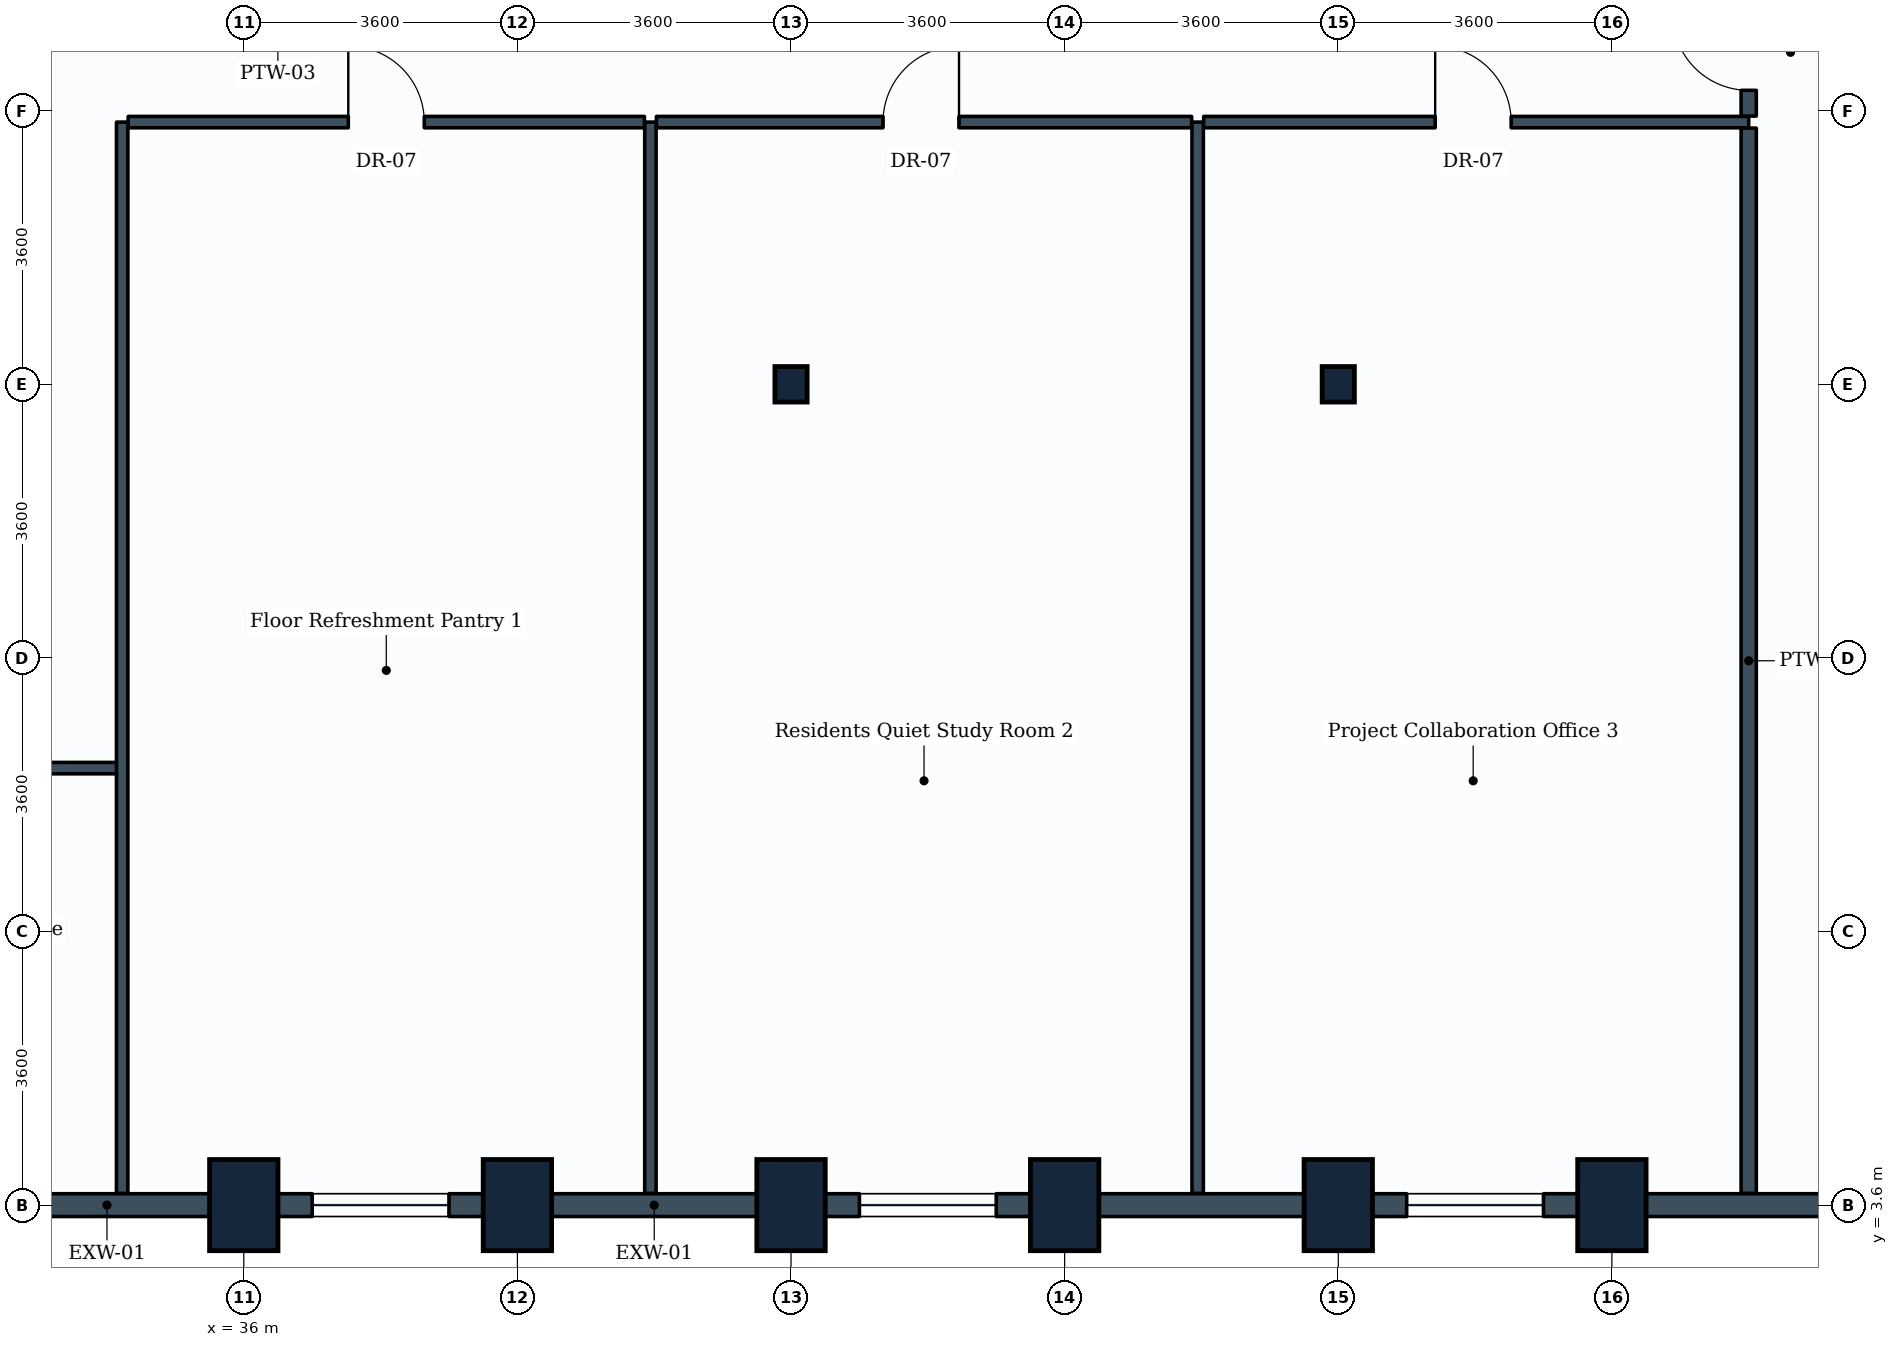
"""IFC4 building model, lengths in metres.
Left out: names, types, materials, properties, quantities, classifications, styles, units other than length and angle.
Written with IfcOpenShell. Run it as: python <this file> out.ifc"""

import sys

from ifc_helpers import new_model, si_unit, direction, frame, frame_2d, origin, origin_2d, place, context, subcontext, project, spatial, rectangle, i_section, extrude, element, fill, save


model = new_model("IFC4")
c1 = context("Model", 3, precision=1e-05, world=origin(), true_north=direction((0.0, 1.0)))
c2 = subcontext(c1, "Body", "Model", "MODEL_VIEW")
j1 = project(units=[si_unit("LENGTHUNIT", "METRE"), si_unit("PLANEANGLEUNIT", "RADIAN")], contexts=[c1])
p1 = place(None, origin())
s1 = spatial("IfcSite", under=j1, at=p1, CompositionType="ELEMENT")
p2 = place(p1, origin())
s2 = spatial("IfcBuilding", under=s1, at=p2, CompositionType="ELEMENT")
p3 = place(p2, frame((0.0, 0.0, 47.4)))
s3 = spatial("IfcBuildingStorey", under=s2, at=p3, CompositionType="ELEMENT", Elevation=47.4)
for number, where, z_axis, x_axis in (
    (1, (36.0, 3.6, 0.0), (0.0, 0.0, 1.0), (1.0, 0.0, 0.0)),
    (2, (39.6, 3.6, 0.0), (0.0, 0.0, 1.0), (1.0, 0.0, 0.0)),
    (3, (43.2, 3.6, 0.0), (0.0, 0.0, 1.0), (1.0, 0.0, 0.0)),
):
    element("IfcColumn", number, at=place(p3, frame(where, z_axis=z_axis, x_axis=x_axis)), inside=s3, PredefinedType="COLUMN", context=c2, shape_type="SweptSolid", body=[
        extrude(rectangle(XDim=0.9, YDim=1.2, at=origin_2d()), origin(), (0.0, 0.0, 1.0), 3.9),
    ])
p4 = place(p3, frame((43.2, 14.4, 0.0), z_axis=(0.0, 0.0, 1.0), x_axis=(1.0, 0.0, 0.0)))
e4 = element("IfcColumn", 4, at=p4, inside=s3, PredefinedType="COLUMN", context=c2, shape_type="SweptSolid", body=[
    extrude(i_section(OverallWidth=0.424, OverallDepth=0.467, WebThickness=0.033, FlangeThickness=0.053, FilletRadius=0.015, at=origin_2d()), origin(), (0.0, 0.0, 1.0), 3.9),
])
for number, where, z_axis, x_axis in (
    (5, (46.8, 3.6, 0.0), (0.0, 0.0, 1.0), (1.0, 0.0, 0.0)),
    (6, (50.4, 3.6, 0.0), (0.0, 0.0, 1.0), (1.0, 0.0, 0.0)),
):
    element("IfcColumn", number, at=place(p3, frame(where, z_axis=z_axis, x_axis=x_axis)), inside=s3, PredefinedType="COLUMN", context=c2, shape_type="SweptSolid", body=[
        extrude(rectangle(XDim=0.9, YDim=1.2, at=origin_2d()), origin(), (0.0, 0.0, 1.0), 3.9),
    ])
p5 = place(p3, frame((50.4, 14.4, 0.0), z_axis=(0.0, 0.0, 1.0), x_axis=(1.0, 0.0, 0.0)))
e7 = element("IfcColumn", 7, at=p5, inside=s3, PredefinedType="COLUMN", context=c2, shape_type="SweptSolid", body=[
    extrude(i_section(OverallWidth=0.424, OverallDepth=0.467, WebThickness=0.033, FlangeThickness=0.053, FilletRadius=0.015, at=origin_2d()), origin(), (0.0, 0.0, 1.0), 3.9),
])
p6 = place(p3, frame((54.0, 3.6, 0.0), z_axis=(0.0, 0.0, 1.0), x_axis=(1.0, 0.0, 0.0)))
e8 = element("IfcColumn", 8, at=p6, inside=s3, PredefinedType="COLUMN", context=c2, shape_type="SweptSolid", body=[
    extrude(rectangle(XDim=0.9, YDim=1.2, at=origin_2d()), origin(), (0.0, 0.0, 1.0), 3.9),
])
p7 = place(p3, frame((36.0, 3.6, 0.0), z_axis=(0.0, 0.0, 1.0), x_axis=(-1.0, 0.0, 0.0)))
e9 = element("IfcWall", 9, at=p7, inside=s3, PredefinedType="STANDARD", context=c2, shape_type="SweptSolid", body=[
    extrude(rectangle(XDim=3.6, YDim=0.3, at=frame_2d((1.8, 0.0))), origin(), (0.0, 0.0, 1.0), 2.93),
])
p8 = place(p3, frame((39.6, 3.6, 0.0), z_axis=(0.0, 0.0, 1.0), x_axis=(-1.0, 0.0, 0.0)))
e10 = element("IfcWall", 10, at=p8, inside=s3, PredefinedType="STANDARD", context=c2, shape_type="SweptSolid", body=[
    extrude(rectangle(XDim=3.6, YDim=0.3, at=frame_2d((1.8, 0.0))), origin(), (0.0, 0.0, 1.0), 2.93),
])
p9 = place(p8, frame((0.9, 0.0, 0.85)))
e11 = element("IfcOpeningElement", 11, at=p9, cuts=e10, PredefinedType="OPENING", context=c2, shape_type="SweptSolid", body=[
    extrude(rectangle(XDim=1.8, YDim=1.35, at=frame_2d((0.9, 0.675))), frame((0.0, 0.16, 0.0), z_axis=(0.0, -1.0, 0.0), x_axis=(1.0, 0.0, 0.0)), (0.0, 0.0, 1.0), 0.32),
])
p10 = place(p3, frame((43.2, 3.6, 0.0), z_axis=(0.0, 0.0, 1.0), x_axis=(-1.0, 0.0, 0.0)))
e12 = element("IfcWall", 12, at=p10, inside=s3, PredefinedType="STANDARD", context=c2, shape_type="SweptSolid", body=[
    extrude(rectangle(XDim=3.6, YDim=0.3, at=frame_2d((1.8, 0.0))), origin(), (0.0, 0.0, 1.0), 2.93),
])
p11 = place(p3, frame((46.8, 3.6, 0.0), z_axis=(0.0, 0.0, 1.0), x_axis=(-1.0, 0.0, 0.0)))
e13 = element("IfcWall", 13, at=p11, inside=s3, PredefinedType="STANDARD", context=c2, shape_type="SweptSolid", body=[
    extrude(rectangle(XDim=3.6, YDim=0.3, at=frame_2d((1.8, 0.0))), origin(), (0.0, 0.0, 1.0), 2.93),
])
p12 = place(p11, frame((0.9, 0.0, 0.85)))
e14 = element("IfcOpeningElement", 14, at=p12, cuts=e13, PredefinedType="OPENING", context=c2, shape_type="SweptSolid", body=[
    extrude(rectangle(XDim=1.8, YDim=1.35, at=frame_2d((0.9, 0.675))), frame((0.0, 0.16, 0.0), z_axis=(0.0, -1.0, 0.0), x_axis=(1.0, 0.0, 0.0)), (0.0, 0.0, 1.0), 0.32),
])
p13 = place(p3, frame((50.4, 3.6, 0.0), z_axis=(0.0, 0.0, 1.0), x_axis=(-1.0, 0.0, 0.0)))
e15 = element("IfcWall", 15, at=p13, inside=s3, PredefinedType="STANDARD", context=c2, shape_type="SweptSolid", body=[
    extrude(rectangle(XDim=3.6, YDim=0.3, at=frame_2d((1.8, 0.0))), origin(), (0.0, 0.0, 1.0), 2.93),
])
p14 = place(p3, frame((54.0, 3.6, 0.0), z_axis=(0.0, 0.0, 1.0), x_axis=(-1.0, 0.0, 0.0)))
e16 = element("IfcWall", 16, at=p14, inside=s3, PredefinedType="STANDARD", context=c2, shape_type="SweptSolid", body=[
    extrude(rectangle(XDim=3.6, YDim=0.3, at=frame_2d((1.8, 0.0))), origin(), (0.0, 0.0, 1.0), 2.93),
])
p15 = place(p14, frame((0.9, 0.0, 0.85)))
e17 = element("IfcOpeningElement", 17, at=p15, cuts=e16, PredefinedType="OPENING", context=c2, shape_type="SweptSolid", body=[
    extrude(rectangle(XDim=1.8, YDim=1.35, at=frame_2d((0.9, 0.675))), frame((0.0, 0.16, 0.0), z_axis=(0.0, -1.0, 0.0), x_axis=(1.0, 0.0, 0.0)), (0.0, 0.0, 1.0), 0.32),
])
p16 = place(p3, frame((57.6, 3.6, 0.0), z_axis=(0.0, 0.0, 1.0), x_axis=(-1.0, 0.0, 0.0)))
e18 = element("IfcWall", 18, at=p16, inside=s3, PredefinedType="STANDARD", context=c2, shape_type="SweptSolid", body=[
    extrude(rectangle(XDim=3.6, YDim=0.3, at=frame_2d((1.8, 0.0))), origin(), (0.0, 0.0, 1.0), 2.93),
])
p17 = place(p3, frame((28.879, 9.35, 0.0), z_axis=(0.0, 0.0, 1.0), x_axis=(1.0, 0.0, 0.0)))
e19 = element("IfcWall", 19, at=p17, inside=s3, PredefinedType="PARTITIONING", context=c2, shape_type="SweptSolid", body=[
    extrude(rectangle(XDim=5.521, YDim=0.15, at=frame_2d((2.76, 0.0))), origin(), (0.0, 0.0, 1.0), 3.635),
])
p18 = place(p17, frame((0.36, 0.0, 0.0)))
e20 = element("IfcOpeningElement", 20, at=p18, cuts=e19, PredefinedType="OPENING", context=c2, shape_type="SweptSolid", body=[
    extrude(rectangle(XDim=1.0, YDim=2.1, at=frame_2d((0.5, 1.05))), frame((0.0, 0.085, 0.0), z_axis=(0.0, -1.0, 0.0), x_axis=(1.0, 0.0, 0.0)), (0.0, 0.0, 1.0), 0.17),
])
for number, where, z_axis, x_axis in (
    (21, (34.4, 3.754, 0.0), (0.0, 0.0, 1.0), (0.0, 1.0, 0.0)),
    (22, (41.35, 3.754, 0.0), (0.0, 0.0, 1.0), (0.0, 1.0, 0.0)),
):
    element("IfcWall", number, at=place(p3, frame(where, z_axis=z_axis, x_axis=x_axis)), inside=s3, PredefinedType="PARTITIONING", context=c2, shape_type="SweptSolid", body=[
        extrude(rectangle(XDim=14.096, YDim=0.15, at=frame_2d((7.048, 0.0))), origin(), (0.0, 0.0, 1.0), 2.93),
    ])
p19 = place(p3, frame((34.479, 17.85, 0.0), z_axis=(0.0, 0.0, 1.0), x_axis=(1.0, 0.0, 0.0)))
e23 = element("IfcWall", 23, at=p19, inside=s3, PredefinedType="PARTITIONING", context=c2, shape_type="SweptSolid", body=[
    extrude(rectangle(XDim=6.792, YDim=0.15, at=frame_2d((3.396, 0.0))), origin(), (0.0, 0.0, 1.0), 3.04),
])
p20 = place(p19, frame((2.896, 0.0, 0.0)))
e24 = element("IfcOpeningElement", 24, at=p20, cuts=e23, PredefinedType="OPENING", context=c2, shape_type="SweptSolid", body=[
    extrude(rectangle(XDim=1.0, YDim=2.1, at=frame_2d((0.5, 1.05))), frame((0.0, 0.085, 0.0), z_axis=(0.0, -1.0, 0.0), x_axis=(1.0, 0.0, 0.0)), (0.0, 0.0, 1.0), 0.17),
])
p21 = place(p3, frame((48.55, 3.754, 0.0), z_axis=(0.0, 0.0, 1.0), x_axis=(0.0, 1.0, 0.0)))
e25 = element("IfcWall", 25, at=p21, inside=s3, PredefinedType="PARTITIONING", context=c2, shape_type="SweptSolid", body=[
    extrude(rectangle(XDim=14.096, YDim=0.15, at=frame_2d((7.048, 0.0))), origin(), (0.0, 0.0, 1.0), 2.93),
])
p22 = place(p3, frame((41.429, 17.85, 0.0), z_axis=(0.0, 0.0, 1.0), x_axis=(1.0, 0.0, 0.0)))
e26 = element("IfcWall", 26, at=p22, inside=s3, PredefinedType="PARTITIONING", context=c2, shape_type="SweptSolid", body=[
    extrude(rectangle(XDim=7.042, YDim=0.15, at=frame_2d((3.521, 0.0))), origin(), (0.0, 0.0, 1.0), 3.03),
])
p23 = place(p22, frame((2.981, 0.0, 0.0)))
e27 = element("IfcOpeningElement", 27, at=p23, cuts=e26, PredefinedType="OPENING", context=c2, shape_type="SweptSolid", body=[
    extrude(rectangle(XDim=1.0, YDim=2.1, at=frame_2d((0.5, 1.05))), frame((0.0, 0.085, 0.0), z_axis=(0.0, -1.0, 0.0), x_axis=(1.0, 0.0, 0.0)), (0.0, 0.0, 1.0), 0.17),
])
p24 = place(p3, frame((48.629, 17.85, 0.0), z_axis=(0.0, 0.0, 1.0), x_axis=(1.0, 0.0, 0.0)))
e28 = element("IfcWall", 28, at=p24, inside=s3, PredefinedType="PARTITIONING", context=c2, shape_type="SweptSolid", body=[
    extrude(rectangle(XDim=7.171, YDim=0.15, at=frame_2d((3.585, 0.0))), origin(), (0.0, 0.0, 1.0), 3.04),
])
p25 = place(p24, frame((3.046, 0.0, 0.0)))
e29 = element("IfcOpeningElement", 29, at=p25, cuts=e28, PredefinedType="OPENING", context=c2, shape_type="SweptSolid", body=[
    extrude(rectangle(XDim=1.0, YDim=2.1, at=frame_2d((0.5, 1.05))), frame((0.0, 0.085, 0.0), z_axis=(0.0, -1.0, 0.0), x_axis=(1.0, 0.0, 0.0)), (0.0, 0.0, 1.0), 0.17),
])
p26 = place(p3, frame((55.8, 3.754, 0.0), z_axis=(0.0, 0.0, 1.0), x_axis=(0.0, 1.0, 0.0)))
e30 = element("IfcWall", 30, at=p26, inside=s3, PredefinedType="PARTITIONING", context=c2, shape_type="SweptSolid", body=[
    extrude(rectangle(XDim=14.017, YDim=0.2, at=frame_2d((7.009, 0.0))), origin(), (0.0, 0.0, 1.0), 2.93),
])
p27 = place(p3, frame((55.8, 17.929, 0.0), z_axis=(0.0, 0.0, 1.0), x_axis=(0.0, 1.0, 0.0)))
e31 = element("IfcWall", 31, at=p27, inside=s3, PredefinedType="PARTITIONING", context=c2, shape_type="SweptSolid", body=[
    extrude(rectangle(XDim=1.692, YDim=0.2, at=frame_2d((0.846, 0.0))), origin(), (0.0, 0.0, 1.0), 3.635),
])
p28 = place(p27, frame((0.339, 0.0, 0.0)))
e32 = element("IfcOpeningElement", 32, at=p28, cuts=e31, PredefinedType="OPENING", context=c2, shape_type="SweptSolid", body=[
    extrude(rectangle(XDim=1.0, YDim=2.1, at=frame_2d((0.5, 1.05))), frame((0.0, 0.11, 0.0), z_axis=(0.0, -1.0, 0.0), x_axis=(1.0, 0.0, 0.0)), (0.0, 0.0, 1.0), 0.22),
])
p29 = place(p9, origin())
e33 = element("IfcWindow", 33, at=p29, inside=s3, PartitioningType="SINGLE_PANEL", PredefinedType="WINDOW", context=c2, shape_type="SweptSolid", body=[
    extrude(rectangle(XDim=1.8, YDim=1.35, at=frame_2d((0.9, 0.675))), frame((0.0, 0.03, 0.0), z_axis=(0.0, -1.0, 0.0), x_axis=(1.0, 0.0, 0.0)), (0.0, 0.0, 1.0), 0.06),
])
fill(e11, e33)
p30 = place(p12, origin())
e34 = element("IfcWindow", 34, at=p30, inside=s3, PartitioningType="SINGLE_PANEL", PredefinedType="WINDOW", context=c2, shape_type="SweptSolid", body=[
    extrude(rectangle(XDim=1.8, YDim=1.35, at=frame_2d((0.9, 0.675))), frame((0.0, 0.03, 0.0), z_axis=(0.0, -1.0, 0.0), x_axis=(1.0, 0.0, 0.0)), (0.0, 0.0, 1.0), 0.06),
])
fill(e14, e34)
p31 = place(p15, origin())
e35 = element("IfcWindow", 35, at=p31, inside=s3, PartitioningType="SINGLE_PANEL", PredefinedType="WINDOW", context=c2, shape_type="SweptSolid", body=[
    extrude(rectangle(XDim=1.8, YDim=1.35, at=frame_2d((0.9, 0.675))), frame((0.0, 0.03, 0.0), z_axis=(0.0, -1.0, 0.0), x_axis=(1.0, 0.0, 0.0)), (0.0, 0.0, 1.0), 0.06),
])
fill(e17, e35)
p32 = place(p20, origin())
e36 = element("IfcDoor", 36, at=p32, inside=s3, OperationType="SINGLE_SWING_LEFT", PredefinedType="DOOR", context=c2, shape_type="SweptSolid", body=[
    extrude(rectangle(XDim=1.0, YDim=2.1, at=frame_2d((0.5, 1.05))), frame((0.0, 0.025, 0.0), z_axis=(0.0, -1.0, 0.0), x_axis=(1.0, 0.0, 0.0)), (0.0, 0.0, 1.0), 0.05),
])
fill(e24, e36)
p33 = place(p23, origin())
e37 = element("IfcDoor", 37, at=p33, inside=s3, OperationType="SINGLE_SWING_RIGHT", PredefinedType="DOOR", context=c2, shape_type="SweptSolid", body=[
    extrude(rectangle(XDim=1.0, YDim=2.1, at=frame_2d((0.5, 1.05))), frame((0.0, 0.025, 0.0), z_axis=(0.0, -1.0, 0.0), x_axis=(1.0, 0.0, 0.0)), (0.0, 0.0, 1.0), 0.05),
])
fill(e27, e37)
p34 = place(p25, origin())
e38 = element("IfcDoor", 38, at=p34, inside=s3, OperationType="SINGLE_SWING_LEFT", PredefinedType="DOOR", context=c2, shape_type="SweptSolid", body=[
    extrude(rectangle(XDim=1.0, YDim=2.1, at=frame_2d((0.5, 1.05))), frame((0.0, 0.025, 0.0), z_axis=(0.0, -1.0, 0.0), x_axis=(1.0, 0.0, 0.0)), (0.0, 0.0, 1.0), 0.05),
])
fill(e29, e38)
p35 = place(p28, origin())
e39 = element("IfcDoor", 39, at=p35, inside=s3, OperationType="SINGLE_SWING_RIGHT", PredefinedType="DOOR", context=c2, shape_type="SweptSolid", body=[
    extrude(rectangle(XDim=1.0, YDim=2.1, at=frame_2d((0.5, 1.05))), frame((0.0, 0.025, 0.0), z_axis=(0.0, -1.0, 0.0), x_axis=(1.0, 0.0, 0.0)), (0.0, 0.0, 1.0), 0.05),
])
fill(e32, e39)
save(model, sys.argv[1])
